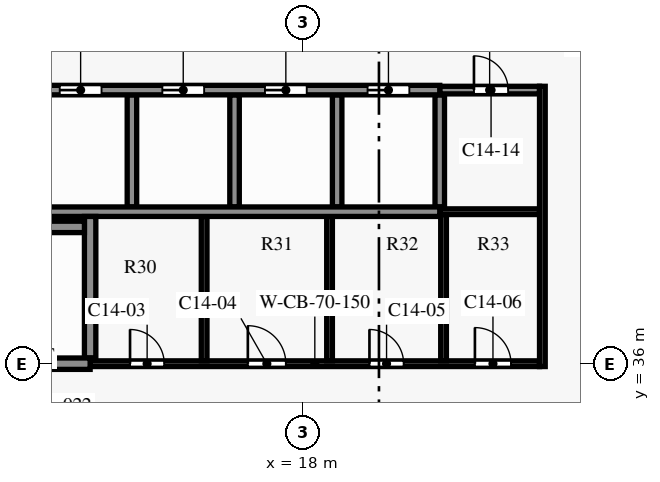
"""IFC4 building model, lengths in metres.
Left out: names, types, materials, properties, quantities, classifications, styles, units other than length and angle.
Written with IfcOpenShell. Run it as: python <this file> out.ifc"""

import sys

from ifc_helpers import new_model, si_unit, direction, frame, frame_2d, origin, place, context, subcontext, project, spatial, rectangle, extrude, element, fill, save


model = new_model("IFC4")
c1 = context("Model", 3, precision=1e-05, world=origin(), true_north=direction((0.0, 1.0)))
c2 = subcontext(c1, "Body", "Model", "MODEL_VIEW")
j1 = project(units=[si_unit("LENGTHUNIT", "METRE"), si_unit("PLANEANGLEUNIT", "RADIAN")], contexts=[c1])
p1 = place(None, origin())
s1 = spatial("IfcSite", under=j1, at=p1, CompositionType="ELEMENT")
p2 = place(p1, origin())
s2 = spatial("IfcBuilding", under=s1, at=p2, CompositionType="ELEMENT")
p3 = place(p2, frame((0.0, 0.0, 96.1)))
s3 = spatial("IfcBuildingStorey", under=s2, at=p3, CompositionType="ELEMENT", Elevation=96.1)
p4 = place(p3, frame((12.4, 36.0, 0.0), z_axis=(0.0, 0.0, 1.0), x_axis=(1.0, 0.0, 0.0)))
e1 = element("IfcWall", 1, at=p4, inside=s3, PredefinedType="SHEAR", context=c2, shape_type="SweptSolid", body=[
    extrude(rectangle(XDim=11.825, YDim=0.15, at=frame_2d((5.913, 0.0))), origin(), (0.0, 0.0, 1.0), 3.5),
])
p5 = place(p4, frame((1.05, 0.0, 0.0)))
e2 = element("IfcOpeningElement", 2, at=p5, cuts=e1, PredefinedType="OPENING", context=c2, shape_type="SweptSolid", body=[
    extrude(rectangle(XDim=0.9, YDim=2.1, at=frame_2d((0.45, 1.05))), frame((0.0, 0.085, 0.0), z_axis=(0.0, -1.0, 0.0), x_axis=(1.0, 0.0, 0.0)), (0.0, 0.0, 1.0), 0.17),
])
p6 = place(p4, frame((4.15, 0.0, 0.0)))
e3 = element("IfcOpeningElement", 3, at=p6, cuts=e1, PredefinedType="OPENING", context=c2, shape_type="SweptSolid", body=[
    extrude(rectangle(XDim=1.0, YDim=2.1, at=frame_2d((0.5, 1.05))), frame((0.0, 0.085, 0.0), z_axis=(0.0, -1.0, 0.0), x_axis=(1.0, 0.0, 0.0)), (0.0, 0.0, 1.0), 0.17),
])
p7 = place(p4, frame((7.35, 0.0, 0.0)))
e4 = element("IfcOpeningElement", 4, at=p7, cuts=e1, PredefinedType="OPENING", context=c2, shape_type="SweptSolid", body=[
    extrude(rectangle(XDim=0.9, YDim=2.1, at=frame_2d((0.45, 1.05))), frame((0.0, 0.085, 0.0), z_axis=(0.0, -1.0, 0.0), x_axis=(1.0, 0.0, 0.0)), (0.0, 0.0, 1.0), 0.17),
])
p8 = place(p4, frame((10.125, 0.0, 0.0)))
e5 = element("IfcOpeningElement", 5, at=p8, cuts=e1, PredefinedType="OPENING", context=c2, shape_type="SweptSolid", body=[
    extrude(rectangle(XDim=0.95, YDim=2.1, at=frame_2d((0.475, 1.05))), frame((0.0, 0.085, 0.0), z_axis=(0.0, -1.0, 0.0), x_axis=(1.0, 0.0, 0.0)), (0.0, 0.0, 1.0), 0.17),
])
p9 = place(p3, frame((4.4, 36.0, 0.0), z_axis=(0.0, 0.0, 1.0), x_axis=(1.0, 0.0, 0.0)))
e6 = element("IfcWall", 6, at=p9, inside=s3, PredefinedType="SHEAR", context=c2, shape_type="SweptSolid", body=[
    extrude(rectangle(XDim=8.0, YDim=0.3, at=frame_2d((4.0, 0.0))), origin(), (0.0, 0.0, 1.0), 3.5),
])
p10 = place(p9, frame((0.3, 0.0, 0.0)))
e7 = element("IfcOpeningElement", 7, at=p10, cuts=e6, PredefinedType="OPENING", context=c2, shape_type="SweptSolid", body=[
    extrude(rectangle(XDim=1.5, YDim=2.2, at=frame_2d((0.75, 1.1))), frame((0.0, 0.16, 0.0), z_axis=(0.0, -1.0, 0.0), x_axis=(1.0, 0.0, 0.0)), (0.0, 0.0, 1.0), 0.32),
])
p11 = place(p3, frame((4.55, 39.6, 0.0), z_axis=(0.0, 0.0, 1.0), x_axis=(1.0, 0.0, 0.0)))
e8 = element("IfcWall", 8, at=p11, inside=s3, PredefinedType="SHEAR", context=c2, shape_type="SweptSolid", body=[
    extrude(rectangle(XDim=7.7, YDim=0.3, at=frame_2d((3.85, 0.0))), origin(), (0.0, 0.0, 1.0), 3.5),
])
p12 = place(p3, frame((21.6, 40.0, 0.0), z_axis=(0.0, 0.0, 1.0), x_axis=(1.0, 0.0, 0.0)))
e9 = element("IfcWall", 9, at=p12, inside=s3, PredefinedType="PARTITIONING", context=c2, shape_type="SweptSolid", body=[
    extrude(rectangle(XDim=2.625, YDim=0.15, at=frame_2d((1.312, 0.0))), origin(), (0.0, 0.0, 1.0), 3.5),
])
p13 = place(p3, frame((8.1, 40.0, 0.0), z_axis=(0.0, 0.0, 1.0), x_axis=(1.0, 0.0, 0.0)))
e10 = element("IfcWall", 10, at=p13, inside=s3, PredefinedType="SHEAR", context=c2, shape_type="SweptSolid", body=[
    extrude(rectangle(XDim=13.5, YDim=0.25, at=frame_2d((6.75, 0.0))), origin(), (0.0, 0.0, 1.0), 3.5),
])
p14 = place(p3, frame((21.6, 43.2, 0.0), z_axis=(0.0, 0.0, 1.0), x_axis=(1.0, 0.0, 0.0)))
e11 = element("IfcWall", 11, at=p14, inside=s3, PredefinedType="PARTITIONING", context=c2, shape_type="SweptSolid", body=[
    extrude(rectangle(XDim=2.625, YDim=0.2, at=frame_2d((1.312, 0.0))), origin(), (0.0, 0.0, 1.0), 3.5),
])
p15 = place(p14, frame((0.9, 0.0, 0.0)))
e12 = element("IfcOpeningElement", 12, at=p15, cuts=e11, PredefinedType="OPENING", context=c2, shape_type="SweptSolid", body=[
    extrude(rectangle(XDim=0.9, YDim=2.1, at=frame_2d((0.45, 1.05))), frame((0.0, 0.11, 0.0), z_axis=(0.0, -1.0, 0.0), x_axis=(1.0, 0.0, 0.0)), (0.0, 0.0, 1.0), 0.22),
])
p16 = place(p3, frame((8.1, 43.2, 0.0), z_axis=(0.0, 0.0, 1.0), x_axis=(1.0, 0.0, 0.0)))
e13 = element("IfcWall", 13, at=p16, inside=s3, PredefinedType="SHEAR", context=c2, shape_type="SweptSolid", body=[
    extrude(rectangle(XDim=13.5, YDim=0.25, at=frame_2d((6.75, 0.0))), origin(), (0.0, 0.0, 1.0), 3.5),
])
p17 = place(p16, frame((0.8, 0.0, 0.0)))
e14 = element("IfcOpeningElement", 14, at=p17, cuts=e13, PredefinedType="OPENING", context=c2, shape_type="SweptSolid", body=[
    extrude(rectangle(XDim=1.1, YDim=2.1, at=frame_2d((0.55, 1.05))), frame((0.0, 0.135, 0.0), z_axis=(0.0, -1.0, 0.0), x_axis=(1.0, 0.0, 0.0)), (0.0, 0.0, 1.0), 0.27),
])
p18 = place(p16, frame((3.5, 0.0, 0.0)))
e15 = element("IfcOpeningElement", 15, at=p18, cuts=e13, PredefinedType="OPENING", context=c2, shape_type="SweptSolid", body=[
    extrude(rectangle(XDim=1.1, YDim=2.1, at=frame_2d((0.55, 1.05))), frame((0.0, 0.135, 0.0), z_axis=(0.0, -1.0, 0.0), x_axis=(1.0, 0.0, 0.0)), (0.0, 0.0, 1.0), 0.27),
])
p19 = place(p16, frame((6.2, 0.0, 0.0)))
e16 = element("IfcOpeningElement", 16, at=p19, cuts=e13, PredefinedType="OPENING", context=c2, shape_type="SweptSolid", body=[
    extrude(rectangle(XDim=1.1, YDim=2.1, at=frame_2d((0.55, 1.05))), frame((0.0, 0.135, 0.0), z_axis=(0.0, -1.0, 0.0), x_axis=(1.0, 0.0, 0.0)), (0.0, 0.0, 1.0), 0.27),
])
p20 = place(p16, frame((8.9, 0.0, 0.0)))
e17 = element("IfcOpeningElement", 17, at=p20, cuts=e13, PredefinedType="OPENING", context=c2, shape_type="SweptSolid", body=[
    extrude(rectangle(XDim=1.1, YDim=2.1, at=frame_2d((0.55, 1.05))), frame((0.0, 0.135, 0.0), z_axis=(0.0, -1.0, 0.0), x_axis=(1.0, 0.0, 0.0)), (0.0, 0.0, 1.0), 0.27),
])
p21 = place(p16, frame((11.6, 0.0, 0.0)))
e18 = element("IfcOpeningElement", 18, at=p21, cuts=e13, PredefinedType="OPENING", context=c2, shape_type="SweptSolid", body=[
    extrude(rectangle(XDim=1.1, YDim=2.1, at=frame_2d((0.55, 1.05))), frame((0.0, 0.135, 0.0), z_axis=(0.0, -1.0, 0.0), x_axis=(1.0, 0.0, 0.0)), (0.0, 0.0, 1.0), 0.27),
])
p22 = place(p3, frame((12.4, 36.15, 0.0), z_axis=(0.0, 0.0, 1.0), x_axis=(0.0, 1.0, 0.0)))
e19 = element("IfcWall", 19, at=p22, inside=s3, PredefinedType="SHEAR", context=c2, shape_type="SweptSolid", body=[
    extrude(rectangle(XDim=3.725, YDim=0.3, at=frame_2d((1.863, 0.0))), origin(), (0.0, 0.0, 1.0), 3.5),
])
p23 = place(p3, frame((13.5, 40.125, 0.0), z_axis=(0.0, 0.0, 1.0), x_axis=(0.0, 1.0, 0.0)))
e20 = element("IfcWall", 20, at=p23, inside=s3, PredefinedType="SHEAR", context=c2, shape_type="SweptSolid", body=[
    extrude(rectangle(XDim=2.95, YDim=0.25, at=frame_2d((1.475, 0.0))), origin(), (0.0, 0.0, 1.0), 3.5),
])
p24 = place(p3, frame((15.4, 36.075, 0.0), z_axis=(0.0, 0.0, 1.0), x_axis=(0.0, 1.0, 0.0)))
e21 = element("IfcWall", 21, at=p24, inside=s3, PredefinedType="PARTITIONING", context=c2, shape_type="SweptSolid", body=[
    extrude(rectangle(XDim=3.8, YDim=0.15, at=frame_2d((1.9, 0.0))), origin(), (0.0, 0.0, 1.0), 3.5),
])
p25 = place(p3, frame((16.2, 40.125, 0.0), z_axis=(0.0, 0.0, 1.0), x_axis=(0.0, 1.0, 0.0)))
e22 = element("IfcWall", 22, at=p25, inside=s3, PredefinedType="SHEAR", context=c2, shape_type="SweptSolid", body=[
    extrude(rectangle(XDim=2.95, YDim=0.25, at=frame_2d((1.475, 0.0))), origin(), (0.0, 0.0, 1.0), 3.5),
])
p26 = place(p3, frame((18.7, 36.075, 0.0), z_axis=(0.0, 0.0, 1.0), x_axis=(0.0, 1.0, 0.0)))
e23 = element("IfcWall", 23, at=p26, inside=s3, PredefinedType="PARTITIONING", context=c2, shape_type="SweptSolid", body=[
    extrude(rectangle(XDim=3.8, YDim=0.15, at=frame_2d((1.9, 0.0))), origin(), (0.0, 0.0, 1.0), 3.5),
])
for number, where, z_axis, x_axis in (
    (24, (18.9, 40.125, 0.0), (0.0, 0.0, 1.0), (0.0, 1.0, 0.0)),
    (25, (21.6, 40.125, 0.0), (0.0, 0.0, 1.0), (0.0, 1.0, 0.0)),
):
    element("IfcWall", number, at=place(p3, frame(where, z_axis=z_axis, x_axis=x_axis)), inside=s3, PredefinedType="SHEAR", context=c2, shape_type="SweptSolid", body=[
        extrude(rectangle(XDim=2.95, YDim=0.25, at=frame_2d((1.475, 0.0))), origin(), (0.0, 0.0, 1.0), 3.5),
    ])
p27 = place(p3, frame((21.7, 36.075, 0.0), z_axis=(0.0, 0.0, 1.0), x_axis=(0.0, 1.0, 0.0)))
e26 = element("IfcWall", 26, at=p27, inside=s3, PredefinedType="PARTITIONING", context=c2, shape_type="SweptSolid", body=[
    extrude(rectangle(XDim=3.85, YDim=0.15, at=frame_2d((1.925, 0.0))), origin(), (0.0, 0.0, 1.0), 3.5),
])
p28 = place(p3, frame((24.3, 35.925, 0.0), z_axis=(0.0, 0.0, 1.0), x_axis=(0.0, 1.0, 0.0)))
e27 = element("IfcWall", 27, at=p28, inside=s3, PredefinedType="PARTITIONING", context=c2, shape_type="SweptSolid", body=[
    extrude(rectangle(XDim=7.375, YDim=0.15, at=frame_2d((3.688, 0.0))), origin(), (0.0, 0.0, 1.0), 3.5),
])
p29 = place(p5, origin())
e28 = element("IfcDoor", 28, at=p29, inside=s3, OperationType="SINGLE_SWING_RIGHT", PredefinedType="DOOR", context=c2, shape_type="SweptSolid", body=[
    extrude(rectangle(XDim=0.9, YDim=2.1, at=frame_2d((0.45, 1.05))), frame((0.0, 0.025, 0.0), z_axis=(0.0, -1.0, 0.0), x_axis=(1.0, 0.0, 0.0)), (0.0, 0.0, 1.0), 0.05),
])
fill(e2, e28)
p30 = place(p6, origin())
e29 = element("IfcDoor", 29, at=p30, inside=s3, OperationType="SINGLE_SWING_LEFT", PredefinedType="DOOR", context=c2, shape_type="SweptSolid", body=[
    extrude(rectangle(XDim=1.0, YDim=2.1, at=frame_2d((0.5, 1.05))), frame((0.0, 0.025, 0.0), z_axis=(0.0, -1.0, 0.0), x_axis=(1.0, 0.0, 0.0)), (0.0, 0.0, 1.0), 0.05),
])
fill(e3, e29)
p31 = place(p7, origin())
e30 = element("IfcDoor", 30, at=p31, inside=s3, OperationType="SINGLE_SWING_RIGHT", PredefinedType="DOOR", context=c2, shape_type="SweptSolid", body=[
    extrude(rectangle(XDim=0.9, YDim=2.1, at=frame_2d((0.45, 1.05))), frame((0.0, 0.025, 0.0), z_axis=(0.0, -1.0, 0.0), x_axis=(1.0, 0.0, 0.0)), (0.0, 0.0, 1.0), 0.05),
])
fill(e4, e30)
p32 = place(p8, origin())
e31 = element("IfcDoor", 31, at=p32, inside=s3, OperationType="SINGLE_SWING_LEFT", PredefinedType="DOOR", context=c2, shape_type="SweptSolid", body=[
    extrude(rectangle(XDim=0.95, YDim=2.1, at=frame_2d((0.475, 1.05))), frame((0.0, 0.025, 0.0), z_axis=(0.0, -1.0, 0.0), x_axis=(1.0, 0.0, 0.0)), (0.0, 0.0, 1.0), 0.05),
])
fill(e5, e31)
p33 = place(p15, origin())
e32 = element("IfcDoor", 32, at=p33, inside=s3, OperationType="SINGLE_SWING_RIGHT", PredefinedType="DOOR", context=c2, shape_type="SweptSolid", body=[
    extrude(rectangle(XDim=0.9, YDim=2.1, at=frame_2d((0.45, 1.05))), frame((0.0, 0.025, 0.0), z_axis=(0.0, -1.0, 0.0), x_axis=(1.0, 0.0, 0.0)), (0.0, 0.0, 1.0), 0.05),
])
fill(e12, e32)
p34 = place(p18, origin())
e33 = element("IfcDoor", 33, at=p34, inside=s3, OperationType="DOUBLE_DOOR_SLIDING", PredefinedType="DOOR", context=c2, shape_type="SweptSolid", body=[
    extrude(rectangle(XDim=1.1, YDim=2.1, at=frame_2d((0.55, 1.05))), frame((0.0, 0.025, 0.0), z_axis=(0.0, -1.0, 0.0), x_axis=(1.0, 0.0, 0.0)), (0.0, 0.0, 1.0), 0.05),
])
fill(e15, e33)
p35 = place(p19, origin())
e34 = element("IfcDoor", 34, at=p35, inside=s3, OperationType="DOUBLE_DOOR_SLIDING", PredefinedType="DOOR", context=c2, shape_type="SweptSolid", body=[
    extrude(rectangle(XDim=1.1, YDim=2.1, at=frame_2d((0.55, 1.05))), frame((0.0, 0.025, 0.0), z_axis=(0.0, -1.0, 0.0), x_axis=(1.0, 0.0, 0.0)), (0.0, 0.0, 1.0), 0.05),
])
fill(e16, e34)
p36 = place(p20, origin())
e35 = element("IfcDoor", 35, at=p36, inside=s3, OperationType="DOUBLE_DOOR_SLIDING", PredefinedType="DOOR", context=c2, shape_type="SweptSolid", body=[
    extrude(rectangle(XDim=1.1, YDim=2.1, at=frame_2d((0.55, 1.05))), frame((0.0, 0.025, 0.0), z_axis=(0.0, -1.0, 0.0), x_axis=(1.0, 0.0, 0.0)), (0.0, 0.0, 1.0), 0.05),
])
fill(e17, e35)
p37 = place(p21, origin())
e36 = element("IfcDoor", 36, at=p37, inside=s3, OperationType="DOUBLE_DOOR_SLIDING", PredefinedType="DOOR", context=c2, shape_type="SweptSolid", body=[
    extrude(rectangle(XDim=1.1, YDim=2.1, at=frame_2d((0.55, 1.05))), frame((0.0, 0.025, 0.0), z_axis=(0.0, -1.0, 0.0), x_axis=(1.0, 0.0, 0.0)), (0.0, 0.0, 1.0), 0.05),
])
fill(e18, e36)
save(model, sys.argv[1])
